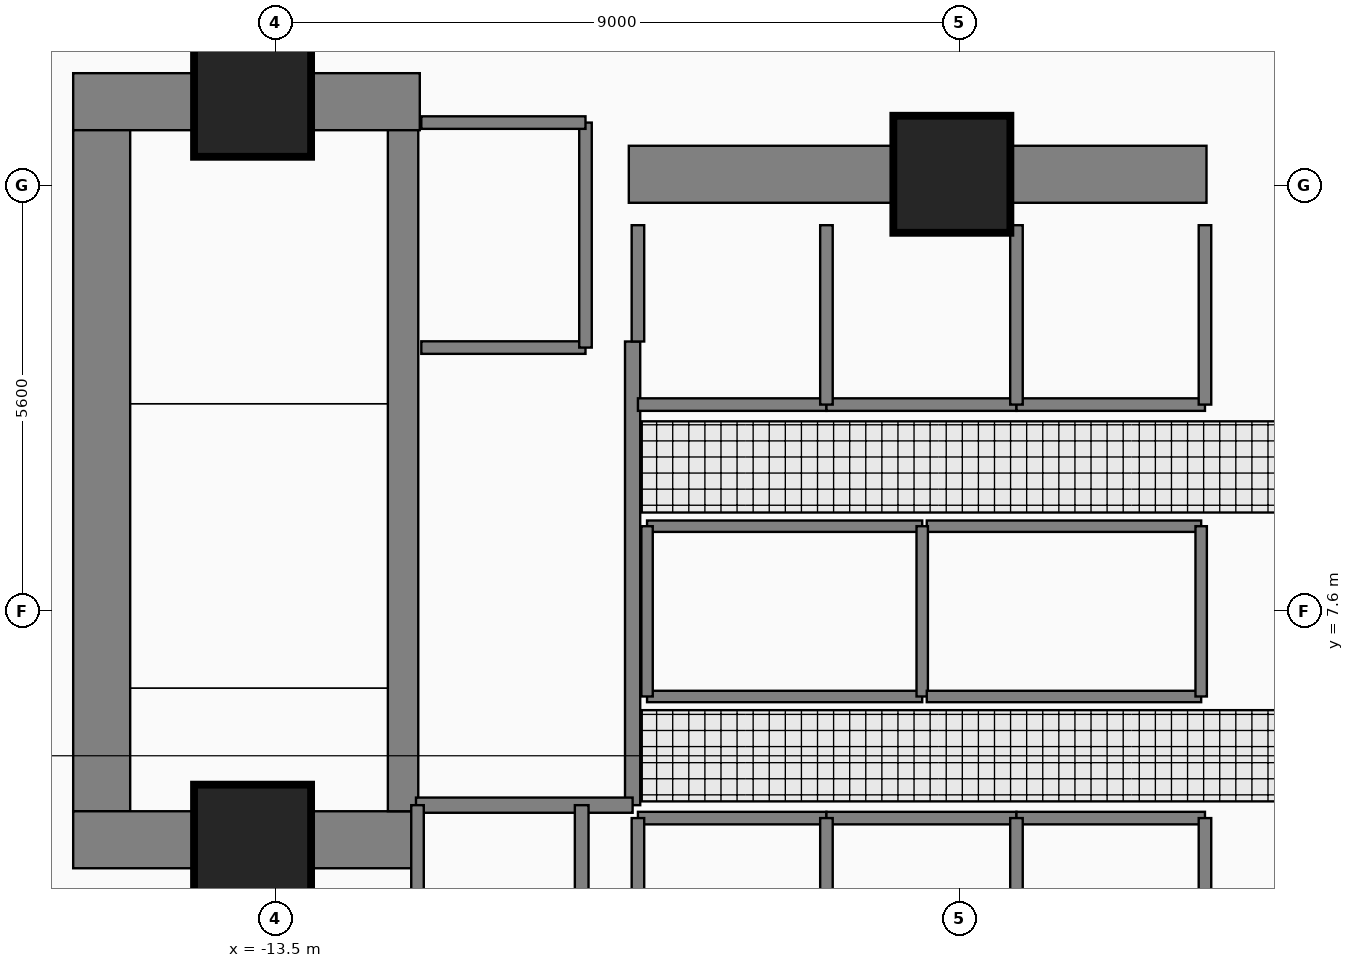
"""IFC4 building model, lengths in metres.
Left out: names, types, materials, properties, quantities, classifications, styles, units other than length and angle.
Written with IfcOpenShell. Run it as: python <this file> out.ifc"""

import sys

from ifc_helpers import new_model, si_unit, direction, frame, frame_2d, origin, origin_2d, place, context, subcontext, project, spatial, rectangle, extrude, element, fill, save


model = new_model("IFC4")
c1 = context("Model", 3, precision=1e-05, world=origin(), true_north=direction((0.0, 1.0)))
c2 = subcontext(c1, "Body", "Model", "MODEL_VIEW")
j1 = project(units=[si_unit("LENGTHUNIT", "METRE"), si_unit("PLANEANGLEUNIT", "RADIAN")], contexts=[c1])
p1 = place(None, origin())
s1 = spatial("IfcSite", under=j1, at=p1, CompositionType="ELEMENT")
p2 = place(p1, origin())
s2 = spatial("IfcBuilding", under=s1, at=p2, CompositionType="ELEMENT")
p3 = place(p2, frame((0.0, 0.0, 154.05)))
s3 = spatial("IfcBuildingStorey", under=s2, at=p3, CompositionType="ELEMENT", Elevation=154.05)
p4 = place(p3, frame((-16.16, 14.305, 0.0), z_axis=(0.0, 0.0, 1.0), x_axis=(1.0, 0.0, 0.0)))
e1 = element("IfcWall", 1, at=p4, inside=s3, PredefinedType="SHEAR", context=c2, shape_type="SweptSolid", body=[
    extrude(rectangle(XDim=4.56, YDim=0.75, at=frame_2d((2.28, 0.0))), origin(), (0.0, 0.0, 1.0), 4.31),
])
p5 = place(p3, frame((-15.785, 4.97, 0.0), z_axis=(0.0, 0.0, 1.0), x_axis=(0.0, 1.0, 0.0)))
e2 = element("IfcWall", 2, at=p5, inside=s3, PredefinedType="SHEAR", context=c2, shape_type="SweptSolid", body=[
    extrude(rectangle(XDim=8.96, YDim=0.75, at=frame_2d((4.48, 0.0))), origin(), (0.0, 0.0, 1.0), 4.31),
])
p6 = place(p3, frame((-16.16, 4.595, 0.0), z_axis=(0.0, 0.0, 1.0), x_axis=(1.0, 0.0, 0.0)))
e3 = element("IfcWall", 3, at=p6, inside=s3, PredefinedType="SHEAR", context=c2, shape_type="SweptSolid", body=[
    extrude(rectangle(XDim=4.56, YDim=0.75, at=frame_2d((2.28, 0.0))), origin(), (0.0, 0.0, 1.0), 4.31),
])
p7 = place(p3, frame((-8.85, 13.35, 0.0), z_axis=(0.0, 0.0, 1.0), x_axis=(1.0, 0.0, 0.0)))
e4 = element("IfcWall", 4, at=p7, inside=s3, PredefinedType="SHEAR", context=c2, shape_type="SweptSolid", body=[
    extrude(rectangle(XDim=7.6, YDim=0.75, at=frame_2d((3.8, 0.0))), origin(), (0.0, 0.0, 1.0), 4.28),
])
p8 = place(p3, frame((-11.82, 4.97, 0.0), z_axis=(0.0, 0.0, 1.0), x_axis=(0.0, 1.0, 0.0)))
e5 = element("IfcWall", 5, at=p8, inside=s3, PredefinedType="SHEAR", context=c2, shape_type="SweptSolid", body=[
    extrude(rectangle(XDim=8.96, YDim=0.4, at=frame_2d((4.48, 0.0))), origin(), (0.0, 0.0, 1.0), 4.31),
])
p9 = place(p8, frame((0.31, 0.0, 0.0)))
e6 = element("IfcOpeningElement", 6, at=p9, cuts=e5, PredefinedType="OPENING", context=c2, shape_type="SweptSolid", body=[
    extrude(rectangle(XDim=1.12, YDim=2.22, at=frame_2d((0.56, 1.11))), frame((0.0, 0.21, 0.0), z_axis=(0.0, -1.0, 0.0), x_axis=(1.0, 0.0, 0.0)), (0.0, 0.0, 1.0), 0.42),
])
for number, where, z_axis, x_axis in (
    (7, (-13.8, 14.35, 0.0), (0.0, 0.0, 1.0), (1.0, 0.0, 0.0)),
    (8, (-4.6, 13.35, 0.0), (0.0, 0.0, 1.0), (1.0, 0.0, 0.0)),
    (9, (-13.8, 4.55, 0.0), (0.0, 0.0, 1.0), (1.0, 0.0, 0.0)),
):
    element("IfcColumn", number, at=place(p3, frame(where, z_axis=z_axis, x_axis=x_axis)), inside=s3, PredefinedType="COLUMN", context=c2, shape_type="SweptSolid", body=[
        extrude(rectangle(XDim=1.5, YDim=1.5, at=origin_2d()), origin(), (0.0, 0.0, 1.0), 4.5),
    ])
p10 = place(p3, frame((-8.8, 5.05, 0.0), z_axis=(0.0, 0.0, 1.0), x_axis=(0.0, 1.0, 0.0)))
e10 = element("IfcWall", 10, at=p10, inside=s3, PredefinedType="PARTITIONING", context=c2, shape_type="SweptSolid", body=[
    extrude(rectangle(XDim=6.1, YDim=0.2, at=frame_2d((3.05, 0.0))), origin(), (0.0, 0.0, 1.0), 4.28),
])
p11 = place(p10, frame((0.25, 0.0, 0.0)))
e11 = element("IfcOpeningElement", 11, at=p11, cuts=e10, PredefinedType="OPENING", context=c2, shape_type="SweptSolid", body=[
    extrude(rectangle(XDim=1.1, YDim=2.2, at=frame_2d((0.55, 1.1))), frame((0.0, 0.11, 0.0), z_axis=(0.0, -1.0, 0.0), x_axis=(1.0, 0.0, 0.0)), (0.0, 0.0, 1.0), 0.22),
])
p12 = place(p10, frame((3.85, 0.0, 0.0)))
e12 = element("IfcOpeningElement", 12, at=p12, cuts=e10, PredefinedType="OPENING", context=c2, shape_type="SweptSolid", body=[
    extrude(rectangle(XDim=1.1, YDim=2.2, at=frame_2d((0.55, 1.1))), frame((0.0, 0.11, 0.0), z_axis=(0.0, -1.0, 0.0), x_axis=(1.0, 0.0, 0.0)), (0.0, 0.0, 1.0), 0.22),
])
p13 = place(p3, frame((-11.58, 11.07, 0.0), z_axis=(0.0, 0.0, 1.0), x_axis=(1.0, 0.0, 0.0)))
e13 = element("IfcWall", 13, at=p13, inside=s3, PredefinedType="PARTITIONING", context=c2, shape_type="SweptSolid", body=[
    extrude(rectangle(XDim=2.16, YDim=0.165, at=frame_2d((1.08, 0.0))), origin(), (0.0, 0.0, 1.0), 4.28),
])
p14 = place(p13, frame((0.53, 0.0, 0.0)))
e14 = element("IfcOpeningElement", 14, at=p14, cuts=e13, PredefinedType="OPENING", context=c2, shape_type="SweptSolid", body=[
    extrude(rectangle(XDim=1.15, YDim=2.25, at=frame_2d((0.575, 1.125))), frame((0.0, 0.093, 0.0), z_axis=(0.0, -1.0, 0.0), x_axis=(1.0, 0.0, 0.0)), (0.0, 0.0, 1.0), 0.185),
])
p15 = place(p3, frame((-8.73, 4.88, 0.0), z_axis=(0.0, 0.0, 1.0), x_axis=(1.0, 0.0, 0.0)))
e15 = element("IfcWall", 15, at=p15, inside=s3, PredefinedType="PARTITIONING", context=c2, shape_type="SweptSolid", body=[
    extrude(rectangle(XDim=2.48, YDim=0.165, at=frame_2d((1.24, 0.0))), origin(), (0.0, 0.0, 1.0), 4.28),
])
p16 = place(p15, frame((0.69, 0.0, 0.0)))
e16 = element("IfcOpeningElement", 16, at=p16, cuts=e15, PredefinedType="OPENING", context=c2, shape_type="SweptSolid", body=[
    extrude(rectangle(XDim=1.1, YDim=2.25, at=frame_2d((0.55, 1.125))), frame((0.0, 0.093, 0.0), z_axis=(0.0, -1.0, 0.0), x_axis=(1.0, 0.0, 0.0)), (0.0, 0.0, 1.0), 0.185),
])
p17 = place(p3, frame((-6.25, 4.88, 0.0), z_axis=(0.0, 0.0, 1.0), x_axis=(1.0, 0.0, 0.0)))
e17 = element("IfcWall", 17, at=p17, inside=s3, PredefinedType="PARTITIONING", context=c2, shape_type="SweptSolid", body=[
    extrude(rectangle(XDim=2.5, YDim=0.165, at=frame_2d((1.25, 0.0))), origin(), (0.0, 0.0, 1.0), 4.28),
])
p18 = place(p17, frame((0.7, 0.0, 0.0)))
e18 = element("IfcOpeningElement", 18, at=p18, cuts=e17, PredefinedType="OPENING", context=c2, shape_type="SweptSolid", body=[
    extrude(rectangle(XDim=1.1, YDim=2.25, at=frame_2d((0.55, 1.125))), frame((0.0, 0.093, 0.0), z_axis=(0.0, -1.0, 0.0), x_axis=(1.0, 0.0, 0.0)), (0.0, 0.0, 1.0), 0.185),
])
p19 = place(p3, frame((-8.73, 10.32, 0.0), z_axis=(0.0, 0.0, 1.0), x_axis=(1.0, 0.0, 0.0)))
e19 = element("IfcWall", 19, at=p19, inside=s3, PredefinedType="PARTITIONING", context=c2, shape_type="SweptSolid", body=[
    extrude(rectangle(XDim=2.48, YDim=0.165, at=frame_2d((1.24, 0.0))), origin(), (0.0, 0.0, 1.0), 4.28),
])
p20 = place(p19, frame((0.69, 0.0, 0.0)))
e20 = element("IfcOpeningElement", 20, at=p20, cuts=e19, PredefinedType="OPENING", context=c2, shape_type="SweptSolid", body=[
    extrude(rectangle(XDim=1.1, YDim=2.25, at=frame_2d((0.55, 1.125))), frame((0.0, 0.093, 0.0), z_axis=(0.0, -1.0, 0.0), x_axis=(1.0, 0.0, 0.0)), (0.0, 0.0, 1.0), 0.185),
])
p21 = place(p3, frame((-6.25, 10.32, 0.0), z_axis=(0.0, 0.0, 1.0), x_axis=(1.0, 0.0, 0.0)))
e21 = element("IfcWall", 21, at=p21, inside=s3, PredefinedType="PARTITIONING", context=c2, shape_type="SweptSolid", body=[
    extrude(rectangle(XDim=2.5, YDim=0.165, at=frame_2d((1.25, 0.0))), origin(), (0.0, 0.0, 1.0), 4.28),
])
p22 = place(p21, frame((0.7, 0.0, 0.0)))
e22 = element("IfcOpeningElement", 22, at=p22, cuts=e21, PredefinedType="OPENING", context=c2, shape_type="SweptSolid", body=[
    extrude(rectangle(XDim=1.1, YDim=2.25, at=frame_2d((0.55, 1.125))), frame((0.0, 0.093, 0.0), z_axis=(0.0, -1.0, 0.0), x_axis=(1.0, 0.0, 0.0)), (0.0, 0.0, 1.0), 0.185),
])
p23 = place(p3, frame((-3.75, 4.88, 0.0), z_axis=(0.0, 0.0, 1.0), x_axis=(1.0, 0.0, 0.0)))
e23 = element("IfcWall", 23, at=p23, inside=s3, PredefinedType="PARTITIONING", context=c2, shape_type="SweptSolid", body=[
    extrude(rectangle(XDim=2.48, YDim=0.165, at=frame_2d((1.24, 0.0))), origin(), (0.0, 0.0, 1.0), 4.28),
])
p24 = place(p23, frame((0.69, 0.0, 0.0)))
e24 = element("IfcOpeningElement", 24, at=p24, cuts=e23, PredefinedType="OPENING", context=c2, shape_type="SweptSolid", body=[
    extrude(rectangle(XDim=1.1, YDim=2.25, at=frame_2d((0.55, 1.125))), frame((0.0, 0.093, 0.0), z_axis=(0.0, -1.0, 0.0), x_axis=(1.0, 0.0, 0.0)), (0.0, 0.0, 1.0), 0.185),
])
p25 = place(p3, frame((-3.75, 10.32, 0.0), z_axis=(0.0, 0.0, 1.0), x_axis=(1.0, 0.0, 0.0)))
e25 = element("IfcWall", 25, at=p25, inside=s3, PredefinedType="PARTITIONING", context=c2, shape_type="SweptSolid", body=[
    extrude(rectangle(XDim=2.48, YDim=0.165, at=frame_2d((1.24, 0.0))), origin(), (0.0, 0.0, 1.0), 4.28),
])
p26 = place(p25, frame((0.69, 0.0, 0.0)))
e26 = element("IfcOpeningElement", 26, at=p26, cuts=e25, PredefinedType="OPENING", context=c2, shape_type="SweptSolid", body=[
    extrude(rectangle(XDim=1.1, YDim=2.25, at=frame_2d((0.55, 1.125))), frame((0.0, 0.093, 0.0), z_axis=(0.0, -1.0, 0.0), x_axis=(1.0, 0.0, 0.0)), (0.0, 0.0, 1.0), 0.185),
])
p27 = place(p3, frame((-8.61, 6.48, 0.0), z_axis=(0.0, 0.0, 1.0), x_axis=(1.0, 0.0, 0.0)))
e27 = element("IfcWall", 27, at=p27, inside=s3, PredefinedType="PARTITIONING", context=c2, shape_type="SweptSolid", body=[
    extrude(rectangle(XDim=3.62, YDim=0.15, at=frame_2d((1.81, 0.0))), origin(), (0.0, 0.0, 1.0), 4.28),
])
p28 = place(p27, frame((1.36, 0.0, 0.0)))
e28 = element("IfcOpeningElement", 28, at=p28, cuts=e27, PredefinedType="OPENING", context=c2, shape_type="SweptSolid", body=[
    extrude(rectangle(XDim=0.9, YDim=2.15, at=frame_2d((0.45, 1.075))), frame((0.0, 0.085, 0.0), z_axis=(0.0, -1.0, 0.0), x_axis=(1.0, 0.0, 0.0)), (0.0, 0.0, 1.0), 0.17),
])
p29 = place(p3, frame((-4.93, 8.72, 0.0), z_axis=(0.0, 0.0, 1.0), x_axis=(1.0, 0.0, 0.0)))
e29 = element("IfcWall", 29, at=p29, inside=s3, PredefinedType="PARTITIONING", context=c2, shape_type="SweptSolid", body=[
    extrude(rectangle(XDim=3.61, YDim=0.15, at=frame_2d((1.805, 0.0))), origin(), (0.0, 0.0, 1.0), 4.28),
])
p30 = place(p29, frame((1.355, 0.0, 0.0)))
e30 = element("IfcOpeningElement", 30, at=p30, cuts=e29, PredefinedType="OPENING", context=c2, shape_type="SweptSolid", body=[
    extrude(rectangle(XDim=0.9, YDim=2.15, at=frame_2d((0.45, 1.075))), frame((0.0, 0.085, 0.0), z_axis=(0.0, -1.0, 0.0), x_axis=(1.0, 0.0, 0.0)), (0.0, 0.0, 1.0), 0.17),
])
p31 = place(p3, frame((-11.65, 5.05, 0.0), z_axis=(0.0, 0.0, 1.0), x_axis=(1.0, 0.0, 0.0)))
e31 = element("IfcWall", 31, at=p31, inside=s3, PredefinedType="PARTITIONING", context=c2, shape_type="SweptSolid", body=[
    extrude(rectangle(XDim=2.85, YDim=0.2, at=frame_2d((1.425, 0.0))), origin(), (0.0, 0.0, 1.0), 4.28),
])
p32 = place(p3, frame((-9.42, 11.07, 0.0), z_axis=(0.0, 0.0, 1.0), x_axis=(0.0, 1.0, 0.0)))
e32 = element("IfcWall", 32, at=p32, inside=s3, PredefinedType="PARTITIONING", context=c2, shape_type="SweptSolid", body=[
    extrude(rectangle(XDim=2.96, YDim=0.165, at=frame_2d((1.48, 0.0))), origin(), (0.0, 0.0, 1.0), 4.28),
])
p33 = place(p3, frame((-11.58, 14.03, 0.0), z_axis=(0.0, 0.0, 1.0), x_axis=(1.0, 0.0, 0.0)))
e33 = element("IfcWall", 33, at=p33, inside=s3, PredefinedType="PARTITIONING", context=c2, shape_type="SweptSolid", body=[
    extrude(rectangle(XDim=2.16, YDim=0.165, at=frame_2d((1.08, 0.0))), origin(), (0.0, 0.0, 1.0), 4.28),
])
for number, where, z_axis, x_axis in (
    (34, (-8.73, 2.52, 0.0), (0.0, 0.0, 1.0), (0.0, 1.0, 0.0)),
    (35, (-6.25, 2.52, 0.0), (0.0, 0.0, 1.0), (0.0, 1.0, 0.0)),
    (36, (-3.75, 2.52, 0.0), (0.0, 0.0, 1.0), (0.0, 1.0, 0.0)),
):
    element("IfcWall", number, at=place(p3, frame(where, z_axis=z_axis, x_axis=x_axis)), inside=s3, PredefinedType="PARTITIONING", context=c2, shape_type="SweptSolid", body=[
        extrude(rectangle(XDim=2.36, YDim=0.165, at=frame_2d((1.18, 0.0))), origin(), (0.0, 0.0, 1.0), 4.28),
    ])
p34 = place(p3, frame((-8.73, 11.15, 0.0), z_axis=(0.0, 0.0, 1.0), x_axis=(0.0, 1.0, 0.0)))
e37 = element("IfcWall", 37, at=p34, inside=s3, PredefinedType="PARTITIONING", context=c2, shape_type="SweptSolid", body=[
    extrude(rectangle(XDim=1.53, YDim=0.165, at=frame_2d((0.765, 0.0))), origin(), (0.0, 0.0, 1.0), 4.28),
])
for number, where, z_axis, x_axis in (
    (38, (-6.25, 10.32, 0.0), (0.0, 0.0, 1.0), (0.0, 1.0, 0.0)),
    (39, (-3.75, 10.32, 0.0), (0.0, 0.0, 1.0), (0.0, 1.0, 0.0)),
    (40, (-1.27, 2.52, 0.0), (0.0, 0.0, 1.0), (0.0, 1.0, 0.0)),
    (41, (-1.27, 10.32, 0.0), (0.0, 0.0, 1.0), (0.0, 1.0, 0.0)),
):
    element("IfcWall", number, at=place(p3, frame(where, z_axis=z_axis, x_axis=x_axis)), inside=s3, PredefinedType="PARTITIONING", context=c2, shape_type="SweptSolid", body=[
        extrude(rectangle(XDim=2.36, YDim=0.165, at=frame_2d((1.18, 0.0))), origin(), (0.0, 0.0, 1.0), 4.28),
    ])
p35 = place(p3, frame((-9.47, 2.45, 0.0), z_axis=(0.0, 0.0, 1.0), x_axis=(0.0, 1.0, 0.0)))
e42 = element("IfcWall", 42, at=p35, inside=s3, PredefinedType="PARTITIONING", context=c2, shape_type="SweptSolid", body=[
    extrude(rectangle(XDim=2.6, YDim=0.18, at=frame_2d((1.3, 0.0))), origin(), (0.0, 0.0, 1.0), 4.28),
])
p36 = place(p3, frame((-11.63, 2.47, 0.0), z_axis=(0.0, 0.0, 1.0), x_axis=(0.0, 1.0, 0.0)))
e43 = element("IfcWall", 43, at=p36, inside=s3, PredefinedType="PARTITIONING", context=c2, shape_type="SweptSolid", body=[
    extrude(rectangle(XDim=2.58, YDim=0.165, at=frame_2d((1.29, 0.0))), origin(), (0.0, 0.0, 1.0), 4.28),
])
p37 = place(p3, frame((-8.61, 8.72, 0.0), z_axis=(0.0, 0.0, 1.0), x_axis=(1.0, 0.0, 0.0)))
e44 = element("IfcWall", 44, at=p37, inside=s3, PredefinedType="PARTITIONING", context=c2, shape_type="SweptSolid", body=[
    extrude(rectangle(XDim=3.62, YDim=0.15, at=frame_2d((1.81, 0.0))), origin(), (0.0, 0.0, 1.0), 4.28),
])
for number, where, z_axis, x_axis in (
    (45, (-8.61, 6.48, 0.0), (0.0, 0.0, 1.0), (0.0, 1.0, 0.0)),
    (46, (-4.99, 6.48, 0.0), (0.0, 0.0, 1.0), (0.0, 1.0, 0.0)),
):
    element("IfcWall", number, at=place(p3, frame(where, z_axis=z_axis, x_axis=x_axis)), inside=s3, PredefinedType="PARTITIONING", context=c2, shape_type="SweptSolid", body=[
        extrude(rectangle(XDim=2.24, YDim=0.15, at=frame_2d((1.12, 0.0))), origin(), (0.0, 0.0, 1.0), 4.28),
    ])
p38 = place(p3, frame((-4.93, 6.48, 0.0), z_axis=(0.0, 0.0, 1.0), x_axis=(1.0, 0.0, 0.0)))
e47 = element("IfcWall", 47, at=p38, inside=s3, PredefinedType="PARTITIONING", context=c2, shape_type="SweptSolid", body=[
    extrude(rectangle(XDim=3.61, YDim=0.15, at=frame_2d((1.805, 0.0))), origin(), (0.0, 0.0, 1.0), 4.28),
])
p39 = place(p3, frame((-1.32, 6.48, 0.0), z_axis=(0.0, 0.0, 1.0), x_axis=(0.0, 1.0, 0.0)))
e48 = element("IfcWall", 48, at=p39, inside=s3, PredefinedType="PARTITIONING", context=c2, shape_type="SweptSolid", body=[
    extrude(rectangle(XDim=2.24, YDim=0.15, at=frame_2d((1.12, 0.0))), origin(), (0.0, 0.0, 1.0), 4.28),
])
p40 = place(p9, origin())
e49 = element("IfcDoor", 49, at=p40, inside=s3, OperationType="SINGLE_SWING_LEFT", PredefinedType="DOOR", context=c2, shape_type="SweptSolid", body=[
    extrude(rectangle(XDim=1.12, YDim=2.22, at=frame_2d((0.56, 1.11))), frame((0.0, 0.025, 0.0), z_axis=(0.0, -1.0, 0.0), x_axis=(1.0, 0.0, 0.0)), (0.0, 0.0, 1.0), 0.05),
])
fill(e6, e49)
p41 = place(p11, origin())
e50 = element("IfcDoor", 50, at=p41, inside=s3, OperationType="SINGLE_SWING_RIGHT", PredefinedType="DOOR", context=c2, shape_type="SweptSolid", body=[
    extrude(rectangle(XDim=1.1, YDim=2.2, at=frame_2d((0.55, 1.1))), frame((0.0, 0.025, 0.0), z_axis=(0.0, -1.0, 0.0), x_axis=(1.0, 0.0, 0.0)), (0.0, 0.0, 1.0), 0.05),
])
fill(e11, e50)
p42 = place(p12, origin())
e51 = element("IfcDoor", 51, at=p42, inside=s3, OperationType="SINGLE_SWING_LEFT", PredefinedType="DOOR", context=c2, shape_type="SweptSolid", body=[
    extrude(rectangle(XDim=1.1, YDim=2.2, at=frame_2d((0.55, 1.1))), frame((0.0, 0.025, 0.0), z_axis=(0.0, -1.0, 0.0), x_axis=(1.0, 0.0, 0.0)), (0.0, 0.0, 1.0), 0.05),
])
fill(e12, e51)
p43 = place(p14, origin())
e52 = element("IfcDoor", 52, at=p43, inside=s3, OperationType="SLIDING_TO_LEFT", PredefinedType="DOOR", context=c2, shape_type="SweptSolid", body=[
    extrude(rectangle(XDim=1.15, YDim=2.25, at=frame_2d((0.575, 1.125))), frame((0.0, 0.025, 0.0), z_axis=(0.0, -1.0, 0.0), x_axis=(1.0, 0.0, 0.0)), (0.0, 0.0, 1.0), 0.05),
])
fill(e14, e52)
p44 = place(p16, origin())
e53 = element("IfcDoor", 53, at=p44, inside=s3, OperationType="SLIDING_TO_LEFT", PredefinedType="DOOR", context=c2, shape_type="SweptSolid", body=[
    extrude(rectangle(XDim=1.1, YDim=2.25, at=frame_2d((0.55, 1.125))), frame((0.0, 0.025, 0.0), z_axis=(0.0, -1.0, 0.0), x_axis=(1.0, 0.0, 0.0)), (0.0, 0.0, 1.0), 0.05),
])
fill(e16, e53)
p45 = place(p18, origin())
e54 = element("IfcDoor", 54, at=p45, inside=s3, OperationType="SLIDING_TO_LEFT", PredefinedType="DOOR", context=c2, shape_type="SweptSolid", body=[
    extrude(rectangle(XDim=1.1, YDim=2.25, at=frame_2d((0.55, 1.125))), frame((0.0, 0.025, 0.0), z_axis=(0.0, -1.0, 0.0), x_axis=(1.0, 0.0, 0.0)), (0.0, 0.0, 1.0), 0.05),
])
fill(e18, e54)
p46 = place(p20, origin())
e55 = element("IfcDoor", 55, at=p46, inside=s3, OperationType="SLIDING_TO_LEFT", PredefinedType="DOOR", context=c2, shape_type="SweptSolid", body=[
    extrude(rectangle(XDim=1.1, YDim=2.25, at=frame_2d((0.55, 1.125))), frame((0.0, 0.025, 0.0), z_axis=(0.0, -1.0, 0.0), x_axis=(1.0, 0.0, 0.0)), (0.0, 0.0, 1.0), 0.05),
])
fill(e20, e55)
p47 = place(p22, origin())
e56 = element("IfcDoor", 56, at=p47, inside=s3, OperationType="SLIDING_TO_LEFT", PredefinedType="DOOR", context=c2, shape_type="SweptSolid", body=[
    extrude(rectangle(XDim=1.1, YDim=2.25, at=frame_2d((0.55, 1.125))), frame((0.0, 0.025, 0.0), z_axis=(0.0, -1.0, 0.0), x_axis=(1.0, 0.0, 0.0)), (0.0, 0.0, 1.0), 0.05),
])
fill(e22, e56)
p48 = place(p24, origin())
e57 = element("IfcDoor", 57, at=p48, inside=s3, OperationType="SLIDING_TO_LEFT", PredefinedType="DOOR", context=c2, shape_type="SweptSolid", body=[
    extrude(rectangle(XDim=1.1, YDim=2.25, at=frame_2d((0.55, 1.125))), frame((0.0, 0.025, 0.0), z_axis=(0.0, -1.0, 0.0), x_axis=(1.0, 0.0, 0.0)), (0.0, 0.0, 1.0), 0.05),
])
fill(e24, e57)
p49 = place(p26, origin())
e58 = element("IfcDoor", 58, at=p49, inside=s3, OperationType="SLIDING_TO_LEFT", PredefinedType="DOOR", context=c2, shape_type="SweptSolid", body=[
    extrude(rectangle(XDim=1.1, YDim=2.25, at=frame_2d((0.55, 1.125))), frame((0.0, 0.025, 0.0), z_axis=(0.0, -1.0, 0.0), x_axis=(1.0, 0.0, 0.0)), (0.0, 0.0, 1.0), 0.05),
])
fill(e26, e58)
p50 = place(p28, origin())
e59 = element("IfcDoor", 59, at=p50, inside=s3, OperationType="SINGLE_SWING_RIGHT", PredefinedType="DOOR", context=c2, shape_type="SweptSolid", body=[
    extrude(rectangle(XDim=0.9, YDim=2.15, at=frame_2d((0.45, 1.075))), frame((0.0, 0.025, 0.0), z_axis=(0.0, -1.0, 0.0), x_axis=(1.0, 0.0, 0.0)), (0.0, 0.0, 1.0), 0.05),
])
fill(e28, e59)
p51 = place(p30, origin())
e60 = element("IfcDoor", 60, at=p51, inside=s3, OperationType="SINGLE_SWING_LEFT", PredefinedType="DOOR", context=c2, shape_type="SweptSolid", body=[
    extrude(rectangle(XDim=0.9, YDim=2.15, at=frame_2d((0.45, 1.075))), frame((0.0, 0.025, 0.0), z_axis=(0.0, -1.0, 0.0), x_axis=(1.0, 0.0, 0.0)), (0.0, 0.0, 1.0), 0.05),
])
fill(e30, e60)
save(model, sys.argv[1])
